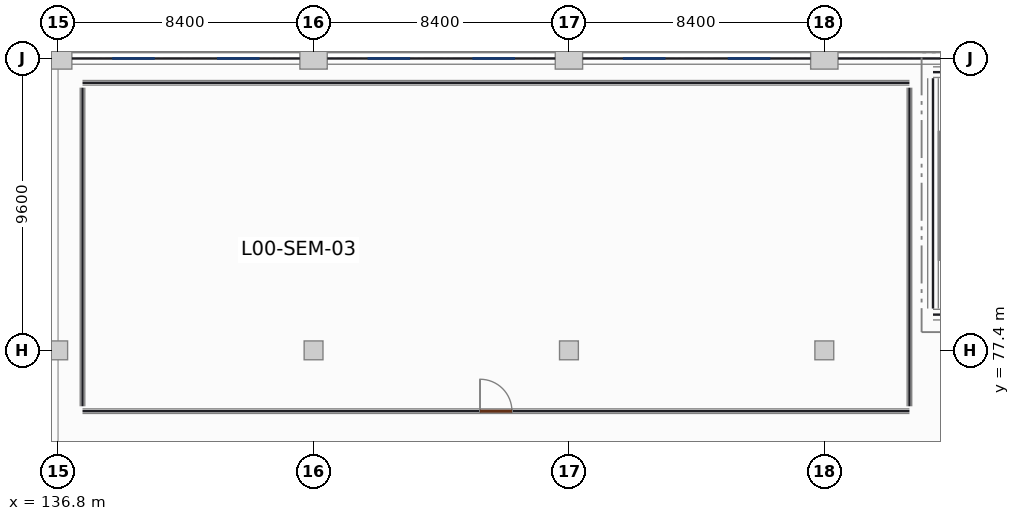
"""IFC4 building model, lengths in metres.
Left out: names, types, materials, properties, quantities, classifications, styles, units other than length and angle.
Written with IfcOpenShell. Run it as: python <this file> out.ifc"""

import sys

from ifc_helpers import new_model, si_unit, direction, frame, frame_2d, origin, origin_2d, place, context, subcontext, project, spatial, rectangle, extrude, element, fill, save


model = new_model("IFC4")
c1 = context("Model", 3, precision=1e-05, world=origin(), true_north=direction((0.0, 1.0)))
c2 = subcontext(c1, "Body", "Model", "MODEL_VIEW")
j1 = project(units=[si_unit("LENGTHUNIT", "METRE"), si_unit("PLANEANGLEUNIT", "RADIAN")], contexts=[c1])
p1 = place(None, origin())
s1 = spatial("IfcSite", under=j1, at=p1, CompositionType="ELEMENT")
p2 = place(p1, origin())
s2 = spatial("IfcBuilding", under=s1, at=p2, CompositionType="ELEMENT")
p3 = place(p2, origin())
s3 = spatial("IfcBuildingStorey", under=s2, at=p3, CompositionType="ELEMENT", Elevation=0.0)
p4 = place(p3, frame((136.8, 77.4, 0.0), z_axis=(0.0, 0.0, 1.0), x_axis=(1.0, 0.0, 0.0)))
e1 = element("IfcColumn", 1, at=p4, inside=s3, PredefinedType="COLUMN", context=c2, shape_type="SweptSolid", body=[
    extrude(rectangle(XDim=0.62, YDim=0.62, at=origin_2d()), origin(), (0.0, 0.0, 1.0), 5.08),
])
p5 = place(p3, frame((136.8, 87.0, 0.0), z_axis=(0.0, 0.0, 1.0), x_axis=(1.0, 0.0, 0.0)))
e2 = element("IfcColumn", 2, at=p5, inside=s3, PredefinedType="COLUMN", context=c2, shape_type="SweptSolid", body=[
    extrude(rectangle(XDim=0.9, YDim=0.7, at=origin_2d()), origin(), (0.0, 0.0, 1.0), 5.08),
])
p6 = place(p3, frame((145.2, 77.4, 0.0), z_axis=(0.0, 0.0, 1.0), x_axis=(1.0, 0.0, 0.0)))
e3 = element("IfcColumn", 3, at=p6, inside=s3, PredefinedType="COLUMN", context=c2, shape_type="SweptSolid", body=[
    extrude(rectangle(XDim=0.62, YDim=0.62, at=origin_2d()), origin(), (0.0, 0.0, 1.0), 5.08),
])
p7 = place(p3, frame((145.2, 87.0, 0.0), z_axis=(0.0, 0.0, 1.0), x_axis=(1.0, 0.0, 0.0)))
e4 = element("IfcColumn", 4, at=p7, inside=s3, PredefinedType="COLUMN", context=c2, shape_type="SweptSolid", body=[
    extrude(rectangle(XDim=0.9, YDim=0.7, at=origin_2d()), origin(), (0.0, 0.0, 1.0), 5.08),
])
p8 = place(p3, frame((153.6, 77.4, 0.0), z_axis=(0.0, 0.0, 1.0), x_axis=(1.0, 0.0, 0.0)))
e5 = element("IfcColumn", 5, at=p8, inside=s3, PredefinedType="COLUMN", context=c2, shape_type="SweptSolid", body=[
    extrude(rectangle(XDim=0.62, YDim=0.62, at=origin_2d()), origin(), (0.0, 0.0, 1.0), 5.08),
])
p9 = place(p3, frame((153.6, 87.0, 0.0), z_axis=(0.0, 0.0, 1.0), x_axis=(1.0, 0.0, 0.0)))
e6 = element("IfcColumn", 6, at=p9, inside=s3, PredefinedType="COLUMN", context=c2, shape_type="SweptSolid", body=[
    extrude(rectangle(XDim=0.9, YDim=0.7, at=origin_2d()), origin(), (0.0, 0.0, 1.0), 5.08),
])
p10 = place(p3, frame((162.0, 77.4, 0.0), z_axis=(0.0, 0.0, 1.0), x_axis=(1.0, 0.0, 0.0)))
e7 = element("IfcColumn", 7, at=p10, inside=s3, PredefinedType="COLUMN", context=c2, shape_type="SweptSolid", body=[
    extrude(rectangle(XDim=0.62, YDim=0.62, at=origin_2d()), origin(), (0.0, 0.0, 1.0), 5.08),
])
p11 = place(p3, frame((162.0, 87.0, 0.0), z_axis=(0.0, 0.0, 1.0), x_axis=(1.0, 0.0, 0.0)))
e8 = element("IfcColumn", 8, at=p11, inside=s3, PredefinedType="COLUMN", context=c2, shape_type="SweptSolid", body=[
    extrude(rectangle(XDim=0.9, YDim=0.7, at=origin_2d()), origin(), (0.0, 0.0, 1.0), 5.08),
])
p12 = place(p3, frame((137.252, 87.0, 0.0), z_axis=(0.0, 0.0, 1.0), x_axis=(1.0, 0.0, 0.0)))
e9 = element("IfcWall", 9, at=p12, inside=s3, PredefinedType="SOLIDWALL", context=c2, shape_type="SweptSolid", body=[
    extrude(rectangle(XDim=7.496, YDim=0.38, at=frame_2d((3.748, 0.0))), origin(), (0.0, 0.0, 1.0), 4.28),
])
p13 = place(p12, frame((1.324, 0.0, 0.85)))
e10 = element("IfcOpeningElement", 10, at=p13, cuts=e9, PredefinedType="OPENING", context=c2, shape_type="SweptSolid", body=[
    extrude(rectangle(XDim=1.4, YDim=1.65, at=frame_2d((0.7, 0.825))), frame((0.0, 0.2, 0.0), z_axis=(0.0, -1.0, 0.0), x_axis=(1.0, 0.0, 0.0)), (0.0, 0.0, 1.0), 0.4),
])
p14 = place(p12, frame((4.772, 0.0, 0.85)))
e11 = element("IfcOpeningElement", 11, at=p14, cuts=e9, PredefinedType="OPENING", context=c2, shape_type="SweptSolid", body=[
    extrude(rectangle(XDim=1.4, YDim=1.65, at=frame_2d((0.7, 0.825))), frame((0.0, 0.2, 0.0), z_axis=(0.0, -1.0, 0.0), x_axis=(1.0, 0.0, 0.0)), (0.0, 0.0, 1.0), 0.4),
])
p15 = place(p3, frame((145.652, 87.0, 0.0), z_axis=(0.0, 0.0, 1.0), x_axis=(1.0, 0.0, 0.0)))
e12 = element("IfcWall", 12, at=p15, inside=s3, PredefinedType="SOLIDWALL", context=c2, shape_type="SweptSolid", body=[
    extrude(rectangle(XDim=7.496, YDim=0.38, at=frame_2d((3.748, 0.0))), origin(), (0.0, 0.0, 1.0), 4.28),
])
p16 = place(p15, frame((1.324, 0.0, 0.85)))
e13 = element("IfcOpeningElement", 13, at=p16, cuts=e12, PredefinedType="OPENING", context=c2, shape_type="SweptSolid", body=[
    extrude(rectangle(XDim=1.4, YDim=1.65, at=frame_2d((0.7, 0.825))), frame((0.0, 0.2, 0.0), z_axis=(0.0, -1.0, 0.0), x_axis=(1.0, 0.0, 0.0)), (0.0, 0.0, 1.0), 0.4),
])
p17 = place(p15, frame((4.772, 0.0, 0.85)))
e14 = element("IfcOpeningElement", 14, at=p17, cuts=e12, PredefinedType="OPENING", context=c2, shape_type="SweptSolid", body=[
    extrude(rectangle(XDim=1.4, YDim=1.65, at=frame_2d((0.7, 0.825))), frame((0.0, 0.2, 0.0), z_axis=(0.0, -1.0, 0.0), x_axis=(1.0, 0.0, 0.0)), (0.0, 0.0, 1.0), 0.4),
])
p18 = place(p3, frame((154.052, 87.0, 0.0), z_axis=(0.0, 0.0, 1.0), x_axis=(1.0, 0.0, 0.0)))
e15 = element("IfcWall", 15, at=p18, inside=s3, PredefinedType="SOLIDWALL", context=c2, shape_type="SweptSolid", body=[
    extrude(rectangle(XDim=7.496, YDim=0.38, at=frame_2d((3.748, 0.0))), origin(), (0.0, 0.0, 1.0), 4.28),
])
p19 = place(p18, frame((1.324, 0.0, 0.85)))
e16 = element("IfcOpeningElement", 16, at=p19, cuts=e15, PredefinedType="OPENING", context=c2, shape_type="SweptSolid", body=[
    extrude(rectangle(XDim=1.4, YDim=1.65, at=frame_2d((0.7, 0.825))), frame((0.0, 0.2, 0.0), z_axis=(0.0, -1.0, 0.0), x_axis=(1.0, 0.0, 0.0)), (0.0, 0.0, 1.0), 0.4),
])
p20 = place(p18, frame((4.772, 0.0, 0.85)))
e17 = element("IfcOpeningElement", 17, at=p20, cuts=e15, PredefinedType="OPENING", context=c2, shape_type="SweptSolid", body=[
    extrude(rectangle(XDim=1.4, YDim=1.65, at=frame_2d((0.7, 0.825))), frame((0.0, 0.2, 0.0), z_axis=(0.0, -1.0, 0.0), x_axis=(1.0, 0.0, 0.0)), (0.0, 0.0, 1.0), 0.4),
])
p21 = place(p3, frame((162.452, 87.0, 0.0), z_axis=(0.0, 0.0, 1.0), x_axis=(1.0, 0.0, 0.0)))
e18 = element("IfcWall", 18, at=p21, inside=s3, PredefinedType="SOLIDWALL", context=c2, shape_type="SweptSolid", body=[
    extrude(rectangle(XDim=7.496, YDim=0.38, at=frame_2d((3.748, 0.0))), origin(), (0.0, 0.0, 1.0), 4.28),
])
p22 = place(p21, frame((4.772, 0.0, 0.85)))
e19 = element("IfcOpeningElement", 19, at=p22, cuts=e18, PredefinedType="OPENING", context=c2, shape_type="SweptSolid", body=[
    extrude(rectangle(XDim=1.4, YDim=1.65, at=frame_2d((0.7, 0.825))), frame((0.0, 0.2, 0.0), z_axis=(0.0, -1.0, 0.0), x_axis=(1.0, 0.0, 0.0)), (0.0, 0.0, 1.0), 0.4),
])
p23 = place(p3, frame((165.575, 78.575, 0.0), z_axis=(0.0, 0.0, 1.0), x_axis=(1.0, 0.0, 0.0)))
e20 = element("IfcWall", 20, at=p23, inside=s3, PredefinedType="SHEAR", context=c2, shape_type="SweptSolid", body=[
    extrude(rectangle(XDim=3.6, YDim=0.35, at=frame_2d((1.8, 0.0))), origin(), (0.0, 0.0, 1.0), 5.08),
])
p24 = place(p23, frame((1.1, 0.0, 0.0)))
e21 = element("IfcOpeningElement", 21, at=p24, cuts=e20, PredefinedType="OPENING", context=c2, shape_type="SweptSolid", body=[
    extrude(rectangle(XDim=1.2, YDim=2.2, at=frame_2d((0.6, 1.1))), frame((0.0, 0.185, 0.0), z_axis=(0.0, -1.0, 0.0), x_axis=(1.0, 0.0, 0.0)), (0.0, 0.0, 1.0), 0.37),
])
p25 = place(p3, frame((165.575, 78.775, 0.0), z_axis=(0.0, 0.0, 1.0), x_axis=(0.0, 1.0, 0.0)))
e22 = element("IfcWall", 22, at=p25, inside=s3, PredefinedType="SHEAR", context=c2, shape_type="SweptSolid", body=[
    extrude(rectangle(XDim=7.575, YDim=0.35, at=frame_2d((3.788, 0.0))), origin(), (0.0, 0.0, 1.0), 5.08),
])
p26 = place(p3, frame((165.575, 86.55, 0.0), z_axis=(0.0, 0.0, 1.0), x_axis=(1.0, 0.0, 0.0)))
e23 = element("IfcWall", 23, at=p26, inside=s3, PredefinedType="SHEAR", context=c2, shape_type="SweptSolid", body=[
    extrude(rectangle(XDim=3.6, YDim=0.35, at=frame_2d((1.8, 0.0))), origin(), (0.0, 0.0, 1.0), 5.08),
])
p27 = place(p3, frame((137.6, 75.4, 0.0), z_axis=(0.0, 0.0, 1.0), x_axis=(1.0, 0.0, 0.0)))
e24 = element("IfcWall", 24, at=p27, inside=s3, PredefinedType="PARTITIONING", context=c2, shape_type="SweptSolid", body=[
    extrude(rectangle(XDim=27.2, YDim=0.15, at=frame_2d((13.6, 0.0))), origin(), (0.0, 0.0, 1.0), 4.12),
])
p28 = place(p27, frame((13.075, 0.0, 0.0)))
e25 = element("IfcOpeningElement", 25, at=p28, cuts=e24, PredefinedType="OPENING", context=c2, shape_type="SweptSolid", body=[
    extrude(rectangle(XDim=1.05, YDim=2.2, at=frame_2d((0.525, 1.1))), frame((0.0, 0.085, 0.0), z_axis=(0.0, -1.0, 0.0), x_axis=(1.0, 0.0, 0.0)), (0.0, 0.0, 1.0), 0.17),
])
p29 = place(p3, frame((137.6, 86.2, 0.0), z_axis=(0.0, 0.0, 1.0), x_axis=(1.0, 0.0, 0.0)))
e26 = element("IfcWall", 26, at=p29, inside=s3, PredefinedType="PARTITIONING", context=c2, shape_type="SweptSolid", body=[
    extrude(rectangle(XDim=27.2, YDim=0.15, at=frame_2d((13.6, 0.0))), origin(), (0.0, 0.0, 1.0), 4.12),
])
for number, where, z_axis, x_axis in (
    (27, (137.6, 75.56, 0.0), (0.0, 0.0, 1.0), (0.0, 1.0, 0.0)),
    (28, (164.8, 75.56, 0.0), (0.0, 0.0, 1.0), (0.0, 1.0, 0.0)),
):
    element("IfcWall", number, at=place(p3, frame(where, z_axis=z_axis, x_axis=x_axis)), inside=s3, PredefinedType="PARTITIONING", context=c2, shape_type="SweptSolid", body=[
        extrude(rectangle(XDim=10.48, YDim=0.15, at=frame_2d((5.24, 0.0))), origin(), (0.0, 0.0, 1.0), 4.12),
    ])
p30 = place(p13, origin())
e29 = element("IfcWindow", 29, at=p30, inside=s3, PartitioningType="SINGLE_PANEL", PredefinedType="WINDOW", context=c2, shape_type="SweptSolid", body=[
    extrude(rectangle(XDim=1.4, YDim=1.65, at=frame_2d((0.7, 0.825))), frame((0.0, 0.03, 0.0), z_axis=(0.0, -1.0, 0.0), x_axis=(1.0, 0.0, 0.0)), (0.0, 0.0, 1.0), 0.06),
])
fill(e10, e29)
p31 = place(p14, origin())
e30 = element("IfcWindow", 30, at=p31, inside=s3, PartitioningType="SINGLE_PANEL", PredefinedType="WINDOW", context=c2, shape_type="SweptSolid", body=[
    extrude(rectangle(XDim=1.4, YDim=1.65, at=frame_2d((0.7, 0.825))), frame((0.0, 0.03, 0.0), z_axis=(0.0, -1.0, 0.0), x_axis=(1.0, 0.0, 0.0)), (0.0, 0.0, 1.0), 0.06),
])
fill(e11, e30)
p32 = place(p16, origin())
e31 = element("IfcWindow", 31, at=p32, inside=s3, PartitioningType="SINGLE_PANEL", PredefinedType="WINDOW", context=c2, shape_type="SweptSolid", body=[
    extrude(rectangle(XDim=1.4, YDim=1.65, at=frame_2d((0.7, 0.825))), frame((0.0, 0.03, 0.0), z_axis=(0.0, -1.0, 0.0), x_axis=(1.0, 0.0, 0.0)), (0.0, 0.0, 1.0), 0.06),
])
fill(e13, e31)
p33 = place(p17, origin())
e32 = element("IfcWindow", 32, at=p33, inside=s3, PartitioningType="SINGLE_PANEL", PredefinedType="WINDOW", context=c2, shape_type="SweptSolid", body=[
    extrude(rectangle(XDim=1.4, YDim=1.65, at=frame_2d((0.7, 0.825))), frame((0.0, 0.03, 0.0), z_axis=(0.0, -1.0, 0.0), x_axis=(1.0, 0.0, 0.0)), (0.0, 0.0, 1.0), 0.06),
])
fill(e14, e32)
p34 = place(p19, origin())
e33 = element("IfcWindow", 33, at=p34, inside=s3, PartitioningType="SINGLE_PANEL", PredefinedType="WINDOW", context=c2, shape_type="SweptSolid", body=[
    extrude(rectangle(XDim=1.4, YDim=1.65, at=frame_2d((0.7, 0.825))), frame((0.0, 0.03, 0.0), z_axis=(0.0, -1.0, 0.0), x_axis=(1.0, 0.0, 0.0)), (0.0, 0.0, 1.0), 0.06),
])
fill(e16, e33)
p35 = place(p20, origin())
e34 = element("IfcWindow", 34, at=p35, inside=s3, PartitioningType="SINGLE_PANEL", PredefinedType="WINDOW", context=c2, shape_type="SweptSolid", body=[
    extrude(rectangle(XDim=1.4, YDim=1.65, at=frame_2d((0.7, 0.825))), frame((0.0, 0.03, 0.0), z_axis=(0.0, -1.0, 0.0), x_axis=(1.0, 0.0, 0.0)), (0.0, 0.0, 1.0), 0.06),
])
fill(e17, e34)
p36 = place(p28, origin())
e35 = element("IfcDoor", 35, at=p36, inside=s3, OperationType="SINGLE_SWING_LEFT", PredefinedType="DOOR", context=c2, shape_type="SweptSolid", body=[
    extrude(rectangle(XDim=1.05, YDim=2.2, at=frame_2d((0.525, 1.1))), frame((0.0, 0.025, 0.0), z_axis=(0.0, -1.0, 0.0), x_axis=(1.0, 0.0, 0.0)), (0.0, 0.0, 1.0), 0.05),
])
fill(e25, e35)
save(model, sys.argv[1])
